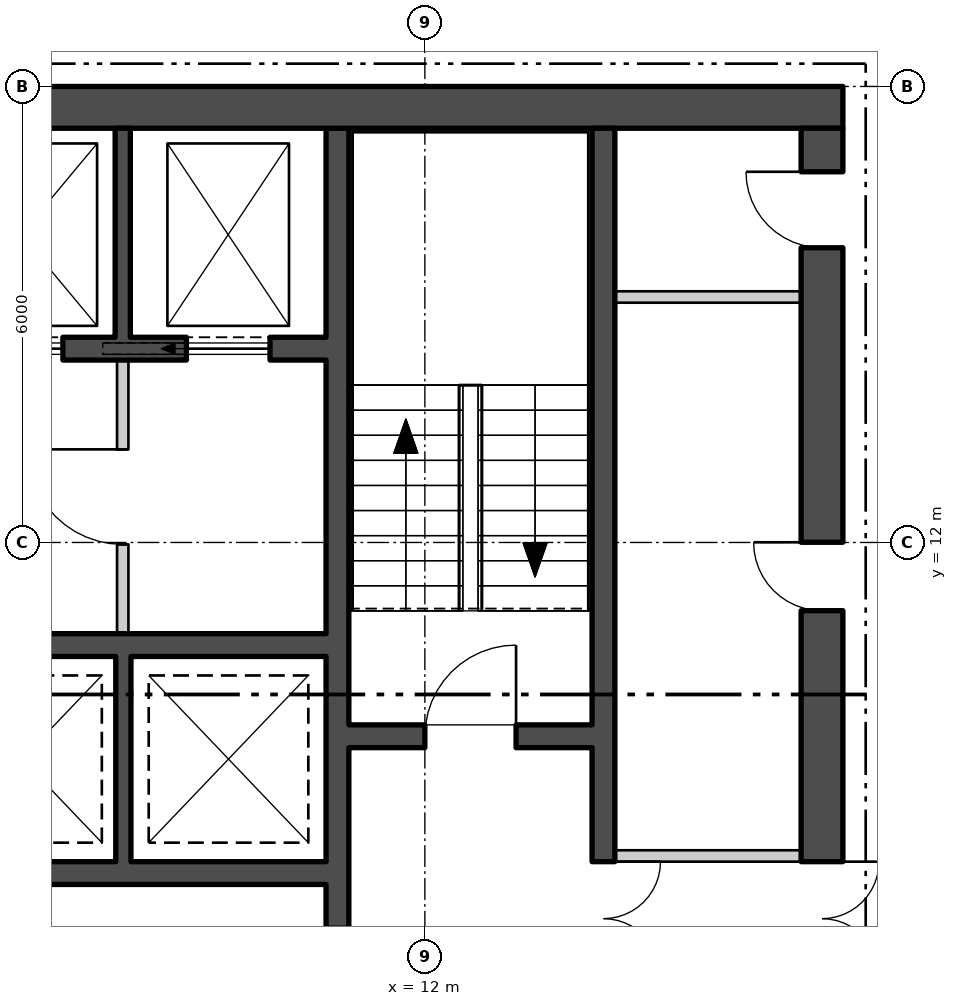
"""IFC4 building model, lengths in metres.
Left out: names, types, materials, properties, quantities, classifications, styles, units other than length and angle.
Written with IfcOpenShell. Run it as: python <this file> out.ifc"""

import sys

from ifc_helpers import new_model, si_unit, direction, frame, frame_2d, origin, place, context, subcontext, project, spatial, polyline, rectangle, outline, extrude, element, fill, save


model = new_model("IFC4")
c1 = context("Model", 3, precision=1e-05, world=origin(), true_north=direction((0.0, 1.0)))
c2 = subcontext(c1, "Body", "Model", "MODEL_VIEW")
j1 = project(units=[si_unit("LENGTHUNIT", "METRE"), si_unit("PLANEANGLEUNIT", "RADIAN")], contexts=[c1])
p1 = place(None, origin())
s1 = spatial("IfcSite", under=j1, at=p1, CompositionType="ELEMENT")
p2 = place(p1, origin())
s2 = spatial("IfcBuilding", under=s1, at=p2, CompositionType="ELEMENT")
p3 = place(p2, frame((0.0, 0.0, 133.8)))
s3 = spatial("IfcBuildingStorey", under=s2, at=p3, CompositionType="ELEMENT", Elevation=133.8)
p4 = place(p3, frame((4.49, -27.423, -0.18), z_axis=(0.0, 0.0, 1.0), x_axis=(0.500000335318, 0.866025210188, 0.0)))
e1 = element("IfcWall", 1, at=p4, inside=s3, PredefinedType="SOLIDWALL", context=c2, shape_type="SweptSolid", body=[
    extrude(outline(polyline([(-0.13, -0.225), (45.88, -0.225), (45.62, 0.225), (0.13, 0.225), (-0.13, -0.225)])), origin(), (0.0, 0.0, 1.0), 6.0),
])
p5 = place(p4, frame((1.425, 0.0, 1.38)))
e2 = element("IfcOpeningElement", 2, at=p5, cuts=e1, PredefinedType="OPENING", context=c2, shape_type="SweptSolid", body=[
    extrude(rectangle(XDim=2.4, YDim=3.6, at=frame_2d((1.2, 1.8))), frame((0.0, 0.235, 0.0), z_axis=(0.0, -1.0, 0.0), x_axis=(1.0, 0.0, 0.0)), (0.0, 0.0, 1.0), 0.47),
])
p6 = place(p4, frame((5.895, 0.0, 1.38)))
e3 = element("IfcOpeningElement", 3, at=p6, cuts=e1, PredefinedType="OPENING", context=c2, shape_type="SweptSolid", body=[
    extrude(rectangle(XDim=2.4, YDim=3.6, at=frame_2d((1.2, 1.8))), frame((0.0, 0.235, 0.0), z_axis=(0.0, -1.0, 0.0), x_axis=(1.0, 0.0, 0.0)), (0.0, 0.0, 1.0), 0.47),
])
p7 = place(p4, frame((10.403, 0.0, 1.38)))
e4 = element("IfcOpeningElement", 4, at=p7, cuts=e1, PredefinedType="OPENING", context=c2, shape_type="SweptSolid", body=[
    extrude(rectangle(XDim=2.4, YDim=3.6, at=frame_2d((1.2, 1.8))), frame((0.0, 0.235, 0.0), z_axis=(0.0, -1.0, 0.0), x_axis=(1.0, 0.0, 0.0)), (0.0, 0.0, 1.0), 0.47),
])
p8 = place(p4, frame((14.912, 0.0, 1.38)))
e5 = element("IfcOpeningElement", 5, at=p8, cuts=e1, PredefinedType="OPENING", context=c2, shape_type="SweptSolid", body=[
    extrude(rectangle(XDim=2.4, YDim=3.6, at=frame_2d((1.2, 1.8))), frame((0.0, 0.235, 0.0), z_axis=(0.0, -1.0, 0.0), x_axis=(1.0, 0.0, 0.0)), (0.0, 0.0, 1.0), 0.47),
])
p9 = place(p4, frame((19.421, 0.0, 1.38)))
e6 = element("IfcOpeningElement", 6, at=p9, cuts=e1, PredefinedType="OPENING", context=c2, shape_type="SweptSolid", body=[
    extrude(rectangle(XDim=2.4, YDim=3.6, at=frame_2d((1.2, 1.8))), frame((0.0, 0.235, 0.0), z_axis=(0.0, -1.0, 0.0), x_axis=(1.0, 0.0, 0.0)), (0.0, 0.0, 1.0), 0.47),
])
p10 = place(p4, frame((23.929, 0.0, 1.38)))
e7 = element("IfcOpeningElement", 7, at=p10, cuts=e1, PredefinedType="OPENING", context=c2, shape_type="SweptSolid", body=[
    extrude(rectangle(XDim=2.4, YDim=3.6, at=frame_2d((1.2, 1.8))), frame((0.0, 0.235, 0.0), z_axis=(0.0, -1.0, 0.0), x_axis=(1.0, 0.0, 0.0)), (0.0, 0.0, 1.0), 0.47),
])
p11 = place(p4, frame((28.438, 0.0, 1.38)))
e8 = element("IfcOpeningElement", 8, at=p11, cuts=e1, PredefinedType="OPENING", context=c2, shape_type="SweptSolid", body=[
    extrude(rectangle(XDim=2.4, YDim=3.6, at=frame_2d((1.2, 1.8))), frame((0.0, 0.235, 0.0), z_axis=(0.0, -1.0, 0.0), x_axis=(1.0, 0.0, 0.0)), (0.0, 0.0, 1.0), 0.47),
])
p12 = place(p4, frame((32.947, 0.0, 1.38)))
e9 = element("IfcOpeningElement", 9, at=p12, cuts=e1, PredefinedType="OPENING", context=c2, shape_type="SweptSolid", body=[
    extrude(rectangle(XDim=2.4, YDim=3.6, at=frame_2d((1.2, 1.8))), frame((0.0, 0.235, 0.0), z_axis=(0.0, -1.0, 0.0), x_axis=(1.0, 0.0, 0.0)), (0.0, 0.0, 1.0), 0.47),
])
p13 = place(p4, frame((37.455, 0.0, 1.38)))
e10 = element("IfcOpeningElement", 10, at=p13, cuts=e1, PredefinedType="OPENING", context=c2, shape_type="SweptSolid", body=[
    extrude(rectangle(XDim=2.4, YDim=3.6, at=frame_2d((1.2, 1.8))), frame((0.0, 0.235, 0.0), z_axis=(0.0, -1.0, 0.0), x_axis=(1.0, 0.0, 0.0)), (0.0, 0.0, 1.0), 0.47),
])
p14 = place(p4, frame((41.925, 0.0, 1.38)))
e11 = element("IfcOpeningElement", 11, at=p14, cuts=e1, PredefinedType="OPENING", context=c2, shape_type="SweptSolid", body=[
    extrude(rectangle(XDim=2.4, YDim=3.6, at=frame_2d((1.2, 1.8))), frame((0.0, 0.235, 0.0), z_axis=(0.0, -1.0, 0.0), x_axis=(1.0, 0.0, 0.0)), (0.0, 0.0, 1.0), 0.47),
])
p15 = place(p3, frame((-17.5, 17.725, 0.0), z_axis=(0.0, 0.0, 1.0), x_axis=(1.0, 0.0, 0.0)))
e12 = element("IfcWall", 12, at=p15, inside=s3, PredefinedType="SHEAR", context=c2, shape_type="SweptSolid", body=[
    extrude(rectangle(XDim=35.0, YDim=0.55, at=frame_2d((17.5, 0.0))), origin(), (0.0, 0.0, 1.0), 5.8),
])
p16 = place(p3, frame((17.225, 0.55, 0.0), z_axis=(0.0, 0.0, 1.0), x_axis=(0.0, 1.0, 0.0)))
e13 = element("IfcWall", 13, at=p16, inside=s3, PredefinedType="SHEAR", context=c2, shape_type="SweptSolid", body=[
    extrude(rectangle(XDim=16.9, YDim=0.55, at=frame_2d((8.45, 0.0))), origin(), (0.0, 0.0, 1.0), 5.8),
])
p17 = place(p16, frame((5.75, 0.0, 0.0)))
e14 = element("IfcOpeningElement", 14, at=p17, cuts=e13, PredefinedType="OPENING", context=c2, shape_type="SweptSolid", body=[
    extrude(rectangle(XDim=1.5, YDim=2.1, at=frame_2d((0.75, 1.05))), frame((0.0, 0.285, 0.0), z_axis=(0.0, -1.0, 0.0), x_axis=(1.0, 0.0, 0.0)), (0.0, 0.0, 1.0), 0.57),
])
p18 = place(p16, frame((1.506, 0.0, 0.0)))
e15 = element("IfcOpeningElement", 15, at=p18, cuts=e13, PredefinedType="OPENING", context=c2, shape_type="SweptSolid", body=[
    extrude(rectangle(XDim=0.9, YDim=2.1, at=frame_2d((0.45, 1.05))), frame((0.0, 0.285, 0.0), z_axis=(0.0, -1.0, 0.0), x_axis=(1.0, 0.0, 0.0)), (0.0, 0.0, 1.0), 0.57),
])
p19 = place(p16, frame((4.489, 0.0, 0.0)))
e16 = element("IfcOpeningElement", 16, at=p19, cuts=e13, PredefinedType="OPENING", context=c2, shape_type="SweptSolid", body=[
    extrude(rectangle(XDim=0.9, YDim=2.1, at=frame_2d((0.45, 1.05))), frame((0.0, 0.285, 0.0), z_axis=(0.0, -1.0, 0.0), x_axis=(1.0, 0.0, 0.0)), (0.0, 0.0, 1.0), 0.57),
])
p20 = place(p16, frame((10.553, 0.0, 0.0)))
e17 = element("IfcOpeningElement", 17, at=p20, cuts=e13, PredefinedType="OPENING", context=c2, shape_type="SweptSolid", body=[
    extrude(rectangle(XDim=0.9, YDim=2.1, at=frame_2d((0.45, 1.05))), frame((0.0, 0.285, 0.0), z_axis=(0.0, -1.0, 0.0), x_axis=(1.0, 0.0, 0.0)), (0.0, 0.0, 1.0), 0.57),
])
p21 = place(p16, frame((15.328, 0.0, 0.0)))
e18 = element("IfcOpeningElement", 18, at=p21, cuts=e13, PredefinedType="OPENING", context=c2, shape_type="SweptSolid", body=[
    extrude(rectangle(XDim=1.0, YDim=2.1, at=frame_2d((0.5, 1.05))), frame((0.0, 0.285, 0.0), z_axis=(0.0, -1.0, 0.0), x_axis=(1.0, 0.0, 0.0)), (0.0, 0.0, 1.0), 0.57),
])
p22 = place(p3, frame((10.85, 0.55, 0.0), z_axis=(0.0, 0.0, 1.0), x_axis=(0.0, 1.0, 0.0)))
e19 = element("IfcWall", 19, at=p22, inside=s3, PredefinedType="SHEAR", context=c2, shape_type="SweptSolid", body=[
    extrude(rectangle(XDim=16.9, YDim=0.3, at=frame_2d((8.45, 0.0))), origin(), (0.0, 0.0, 1.0), 5.8),
])
p23 = place(p22, frame((5.125, 0.0, 0.0)))
e20 = element("IfcOpeningElement", 20, at=p23, cuts=e19, PredefinedType="OPENING", context=c2, shape_type="SweptSolid", body=[
    extrude(rectangle(XDim=1.25, YDim=2.1, at=frame_2d((0.625, 1.05))), frame((0.0, 0.16, 0.0), z_axis=(0.0, -1.0, 0.0), x_axis=(1.0, 0.0, 0.0)), (0.0, 0.0, 1.0), 0.32),
])
p24 = place(p22, frame((1.55, 0.0, 0.0)))
e21 = element("IfcOpeningElement", 21, at=p24, cuts=e19, PredefinedType="OPENING", context=c2, shape_type="SweptSolid", body=[
    extrude(rectangle(XDim=1.0, YDim=2.1, at=frame_2d((0.5, 1.05))), frame((0.0, 0.16, 0.0), z_axis=(0.0, -1.0, 0.0), x_axis=(1.0, 0.0, 0.0)), (0.0, 0.0, 1.0), 0.32),
])
p25 = place(p3, frame((14.35, 0.55, 0.0), z_axis=(0.0, 0.0, 1.0), x_axis=(0.0, 1.0, 0.0)))
e22 = element("IfcWall", 22, at=p25, inside=s3, PredefinedType="SHEAR", context=c2, shape_type="SweptSolid", body=[
    extrude(rectangle(XDim=16.9, YDim=0.3, at=frame_2d((8.45, 0.0))), origin(), (0.0, 0.0, 1.0), 5.8),
])
p26 = place(p25, frame((5.75, 0.0, 0.0)))
e23 = element("IfcOpeningElement", 23, at=p26, cuts=e22, PredefinedType="OPENING", context=c2, shape_type="SweptSolid", body=[
    extrude(rectangle(XDim=1.5, YDim=2.1, at=frame_2d((0.75, 1.05))), frame((0.0, 0.16, 0.0), z_axis=(0.0, -1.0, 0.0), x_axis=(1.0, 0.0, 0.0)), (0.0, 0.0, 1.0), 0.32),
])
p27 = place(p3, frame((11.0, 9.45, 0.0), z_axis=(0.0, 0.0, 1.0), x_axis=(1.0, 0.0, 0.0)))
e24 = element("IfcWall", 24, at=p27, inside=s3, PredefinedType="SHEAR", context=c2, shape_type="SweptSolid", body=[
    extrude(rectangle(XDim=3.2, YDim=0.3, at=frame_2d((1.6, 0.0))), origin(), (0.0, 0.0, 1.0), 5.8),
])
p28 = place(p27, frame((1.0, 0.0, 0.0)))
e25 = element("IfcOpeningElement", 25, at=p28, cuts=e24, PredefinedType="OPENING", context=c2, shape_type="SweptSolid", body=[
    extrude(rectangle(XDim=1.2, YDim=2.1, at=frame_2d((0.6, 1.05))), frame((0.0, 0.16, 0.0), z_axis=(0.0, -1.0, 0.0), x_axis=(1.0, 0.0, 0.0)), (0.0, 0.0, 1.0), 0.32),
])
p29 = place(p3, frame((-10.7, 14.55, 0.0), z_axis=(0.0, 0.0, 1.0), x_axis=(1.0, 0.0, 0.0)))
e26 = element("IfcWall", 26, at=p29, inside=s3, PredefinedType="SHEAR", context=c2, shape_type="SweptSolid", body=[
    extrude(rectangle(XDim=21.4, YDim=0.3, at=frame_2d((10.7, 0.0))), origin(), (0.0, 0.0, 1.0), 5.8),
])
p30 = place(p29, frame((0.738, 0.0, 0.0)))
e27 = element("IfcOpeningElement", 27, at=p30, cuts=e26, PredefinedType="OPENING", context=c2, shape_type="SweptSolid", body=[
    extrude(rectangle(XDim=1.1, YDim=2.1, at=frame_2d((0.55, 1.05))), frame((0.0, 0.16, 0.0), z_axis=(0.0, -1.0, 0.0), x_axis=(1.0, 0.0, 0.0)), (0.0, 0.0, 1.0), 0.32),
])
p31 = place(p29, frame((3.462, 0.0, 0.0)))
e28 = element("IfcOpeningElement", 28, at=p31, cuts=e26, PredefinedType="OPENING", context=c2, shape_type="SweptSolid", body=[
    extrude(rectangle(XDim=1.1, YDim=2.1, at=frame_2d((0.55, 1.05))), frame((0.0, 0.16, 0.0), z_axis=(0.0, -1.0, 0.0), x_axis=(1.0, 0.0, 0.0)), (0.0, 0.0, 1.0), 0.32),
])
p32 = place(p29, frame((6.138, 0.0, 0.0)))
e29 = element("IfcOpeningElement", 29, at=p32, cuts=e26, PredefinedType="OPENING", context=c2, shape_type="SweptSolid", body=[
    extrude(rectangle(XDim=1.1, YDim=2.1, at=frame_2d((0.55, 1.05))), frame((0.0, 0.16, 0.0), z_axis=(0.0, -1.0, 0.0), x_axis=(1.0, 0.0, 0.0)), (0.0, 0.0, 1.0), 0.32),
])
p33 = place(p29, frame((8.812, 0.0, 0.0)))
e30 = element("IfcOpeningElement", 30, at=p33, cuts=e26, PredefinedType="OPENING", context=c2, shape_type="SweptSolid", body=[
    extrude(rectangle(XDim=1.1, YDim=2.1, at=frame_2d((0.55, 1.05))), frame((0.0, 0.16, 0.0), z_axis=(0.0, -1.0, 0.0), x_axis=(1.0, 0.0, 0.0)), (0.0, 0.0, 1.0), 0.32),
])
p34 = place(p29, frame((11.488, 0.0, 0.0)))
e31 = element("IfcOpeningElement", 31, at=p34, cuts=e26, PredefinedType="OPENING", context=c2, shape_type="SweptSolid", body=[
    extrude(rectangle(XDim=1.1, YDim=2.1, at=frame_2d((0.55, 1.05))), frame((0.0, 0.16, 0.0), z_axis=(0.0, -1.0, 0.0), x_axis=(1.0, 0.0, 0.0)), (0.0, 0.0, 1.0), 0.32),
])
p35 = place(p29, frame((14.162, 0.0, 0.0)))
e32 = element("IfcOpeningElement", 32, at=p35, cuts=e26, PredefinedType="OPENING", context=c2, shape_type="SweptSolid", body=[
    extrude(rectangle(XDim=1.1, YDim=2.1, at=frame_2d((0.55, 1.05))), frame((0.0, 0.16, 0.0), z_axis=(0.0, -1.0, 0.0), x_axis=(1.0, 0.0, 0.0)), (0.0, 0.0, 1.0), 0.32),
])
p36 = place(p29, frame((16.837, 0.0, 0.0)))
e33 = element("IfcOpeningElement", 33, at=p36, cuts=e26, PredefinedType="OPENING", context=c2, shape_type="SweptSolid", body=[
    extrude(rectangle(XDim=1.1, YDim=2.1, at=frame_2d((0.55, 1.05))), frame((0.0, 0.16, 0.0), z_axis=(0.0, -1.0, 0.0), x_axis=(1.0, 0.0, 0.0)), (0.0, 0.0, 1.0), 0.32),
])
p37 = place(p29, frame((19.562, 0.0, 0.0)))
e34 = element("IfcOpeningElement", 34, at=p37, cuts=e26, PredefinedType="OPENING", context=c2, shape_type="SweptSolid", body=[
    extrude(rectangle(XDim=1.1, YDim=2.1, at=frame_2d((0.55, 1.05))), frame((0.0, 0.16, 0.0), z_axis=(0.0, -1.0, 0.0), x_axis=(1.0, 0.0, 0.0)), (0.0, 0.0, 1.0), 0.32),
])
p38 = place(p3, frame((2.6, 10.65, 0.0), z_axis=(0.0, 0.0, 1.0), x_axis=(1.0, 0.0, 0.0)))
e35 = element("IfcWall", 35, at=p38, inside=s3, PredefinedType="SHEAR", context=c2, shape_type="SweptSolid", body=[
    extrude(rectangle(XDim=8.1, YDim=0.3, at=frame_2d((4.05, 0.0))), origin(), (0.0, 0.0, 1.0), 5.8),
])
p39 = place(p38, frame((0.883, 0.0, 0.0)))
e36 = element("IfcOpeningElement", 36, at=p39, cuts=e35, PredefinedType="OPENING", context=c2, shape_type="SweptSolid", body=[
    extrude(rectangle(XDim=1.1, YDim=2.1, at=frame_2d((0.55, 1.05))), frame((0.0, 0.16, 0.0), z_axis=(0.0, -1.0, 0.0), x_axis=(1.0, 0.0, 0.0)), (0.0, 0.0, 1.0), 0.32),
])
p40 = place(p3, frame((2.6, 7.65, 0.0), z_axis=(0.0, 0.0, 1.0), x_axis=(1.0, 0.0, 0.0)))
e37 = element("IfcWall", 37, at=p40, inside=s3, PredefinedType="SHEAR", context=c2, shape_type="SweptSolid", body=[
    extrude(rectangle(XDim=8.1, YDim=0.3, at=frame_2d((4.05, 0.0))), origin(), (0.0, 0.0, 1.0), 5.8),
])
p41 = place(p3, frame((8.025, 14.7, 0.0), z_axis=(0.0, 0.0, 1.0), x_axis=(0.0, 1.0, 0.0)))
e38 = element("IfcWall", 38, at=p41, inside=s3, PredefinedType="SHEAR", context=c2, shape_type="SweptSolid", body=[
    extrude(rectangle(XDim=2.75, YDim=0.2, at=frame_2d((1.375, 0.0))), origin(), (0.0, 0.0, 1.0), 5.8),
])
p42 = place(p3, frame((8.033, 7.8, 0.0), z_axis=(0.0, 0.0, 1.0), x_axis=(0.0, 1.0, 0.0)))
e39 = element("IfcWall", 39, at=p42, inside=s3, PredefinedType="SHEAR", context=c2, shape_type="SweptSolid", body=[
    extrude(rectangle(XDim=2.7, YDim=0.2, at=frame_2d((1.35, 0.0))), origin(), (0.0, 0.0, 1.0), 5.8),
])
p43 = place(p3, frame((8.025, 10.8, 0.0), z_axis=(0.0, 0.0, 1.0), x_axis=(0.0, 1.0, 0.0)))
e40 = element("IfcWall", 40, at=p43, inside=s3, PredefinedType="PARTITIONING", context=c2, shape_type="SweptSolid", body=[
    extrude(rectangle(XDim=3.6, YDim=0.15, at=frame_2d((1.8, 0.0))), origin(), (0.0, 0.0, 1.0), 5.8),
])
p44 = place(p43, frame((1.175, 0.0, 0.0)))
e41 = element("IfcOpeningElement", 41, at=p44, cuts=e40, PredefinedType="OPENING", context=c2, shape_type="SweptSolid", body=[
    extrude(rectangle(XDim=1.25, YDim=2.1, at=frame_2d((0.625, 1.05))), frame((0.0, 0.085, 0.0), z_axis=(0.0, -1.0, 0.0), x_axis=(1.0, 0.0, 0.0)), (0.0, 0.0, 1.0), 0.17),
])
p45 = place(p3, frame((14.5, 7.875, 0.0), z_axis=(0.0, 0.0, 1.0), x_axis=(1.0, 0.0, 0.0)))
e42 = element("IfcWall", 42, at=p45, inside=s3, PredefinedType="PARTITIONING", context=c2, shape_type="SweptSolid", body=[
    extrude(rectangle(XDim=2.45, YDim=0.15, at=frame_2d((1.225, 0.0))), origin(), (0.0, 0.0, 1.0), 5.5),
])
p46 = place(p3, frame((14.5, 15.23, 0.0), z_axis=(0.0, 0.0, 1.0), x_axis=(1.0, 0.0, 0.0)))
e43 = element("IfcWall", 43, at=p46, inside=s3, PredefinedType="PARTITIONING", context=c2, shape_type="SweptSolid", body=[
    extrude(rectangle(XDim=2.45, YDim=0.15, at=frame_2d((1.225, 0.0))), origin(), (0.0, 0.0, 1.0), 5.8),
])
p47 = place(p36, origin())
e44 = element("IfcDoor", 44, at=p47, inside=s3, OperationType="SLIDING_TO_LEFT", PredefinedType="DOOR", context=c2, shape_type="SweptSolid", body=[
    extrude(rectangle(XDim=1.1, YDim=2.1, at=frame_2d((0.55, 1.05))), frame((0.0, 0.025, 0.0), z_axis=(0.0, -1.0, 0.0), x_axis=(1.0, 0.0, 0.0)), (0.0, 0.0, 1.0), 0.05),
])
fill(e33, e44)
p48 = place(p37, origin())
e45 = element("IfcDoor", 45, at=p48, inside=s3, OperationType="SLIDING_TO_LEFT", PredefinedType="DOOR", context=c2, shape_type="SweptSolid", body=[
    extrude(rectangle(XDim=1.1, YDim=2.1, at=frame_2d((0.55, 1.05))), frame((0.0, 0.025, 0.0), z_axis=(0.0, -1.0, 0.0), x_axis=(1.0, 0.0, 0.0)), (0.0, 0.0, 1.0), 0.05),
])
fill(e34, e45)
p49 = place(p44, origin())
e46 = element("IfcDoor", 46, at=p49, inside=s3, OperationType="SINGLE_SWING_LEFT", PredefinedType="DOOR", context=c2, shape_type="SweptSolid", body=[
    extrude(rectangle(XDim=1.25, YDim=2.1, at=frame_2d((0.625, 1.05))), frame((0.0, 0.025, 0.0), z_axis=(0.0, -1.0, 0.0), x_axis=(1.0, 0.0, 0.0)), (0.0, 0.0, 1.0), 0.05),
])
fill(e41, e46)
p50 = place(p28, origin())
e47 = element("IfcDoor", 47, at=p50, inside=s3, OperationType="SINGLE_SWING_LEFT", PredefinedType="DOOR", context=c2, shape_type="SweptSolid", body=[
    extrude(rectangle(XDim=1.2, YDim=2.1, at=frame_2d((0.6, 1.05))), frame((0.0, 0.025, 0.0), z_axis=(0.0, -1.0, 0.0), x_axis=(1.0, 0.0, 0.0)), (0.0, 0.0, 1.0), 0.05),
])
fill(e25, e47)
p51 = place(p26, origin())
e48 = element("IfcDoor", 48, at=p51, inside=s3, OperationType="DOUBLE_DOOR_SINGLE_SWING", PredefinedType="DOOR", context=c2, shape_type="SweptSolid", body=[
    extrude(rectangle(XDim=1.5, YDim=2.1, at=frame_2d((0.75, 1.05))), frame((0.0, 0.025, 0.0), z_axis=(0.0, -1.0, 0.0), x_axis=(1.0, 0.0, 0.0)), (0.0, 0.0, 1.0), 0.05),
])
fill(e23, e48)
p52 = place(p17, origin())
e49 = element("IfcDoor", 49, at=p52, inside=s3, OperationType="DOUBLE_DOOR_SINGLE_SWING", PredefinedType="DOOR", context=c2, shape_type="SweptSolid", body=[
    extrude(rectangle(XDim=1.5, YDim=2.1, at=frame_2d((0.75, 1.05))), frame((0.0, 0.025, 0.0), z_axis=(0.0, -1.0, 0.0), x_axis=(1.0, 0.0, 0.0)), (0.0, 0.0, 1.0), 0.05),
])
fill(e14, e49)
p53 = place(p20, origin())
e50 = element("IfcDoor", 50, at=p53, inside=s3, OperationType="SINGLE_SWING_LEFT", PredefinedType="DOOR", context=c2, shape_type="SweptSolid", body=[
    extrude(rectangle(XDim=0.9, YDim=2.1, at=frame_2d((0.45, 1.05))), frame((0.0, 0.025, 0.0), z_axis=(0.0, -1.0, 0.0), x_axis=(1.0, 0.0, 0.0)), (0.0, 0.0, 1.0), 0.05),
])
fill(e17, e50)
p54 = place(p21, origin())
e51 = element("IfcDoor", 51, at=p54, inside=s3, OperationType="SINGLE_SWING_LEFT", PredefinedType="DOOR", context=c2, shape_type="SweptSolid", body=[
    extrude(rectangle(XDim=1.0, YDim=2.1, at=frame_2d((0.5, 1.05))), frame((0.0, 0.025, 0.0), z_axis=(0.0, -1.0, 0.0), x_axis=(1.0, 0.0, 0.0)), (0.0, 0.0, 1.0), 0.05),
])
fill(e18, e51)
save(model, sys.argv[1])
